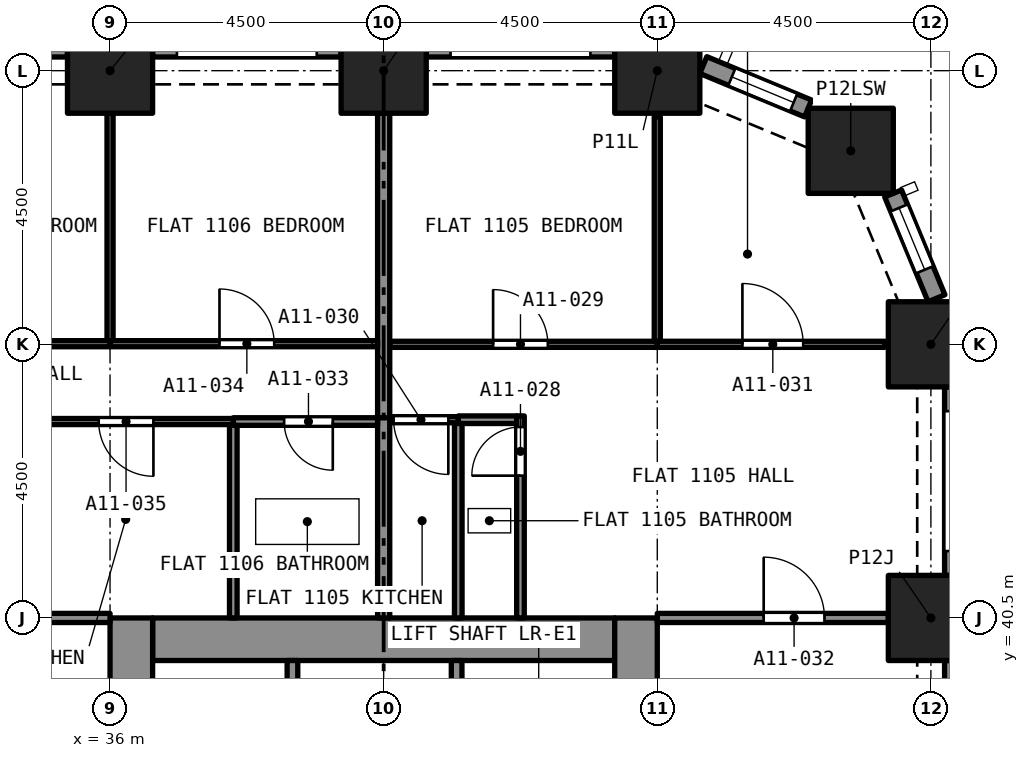
"""IFC4 building model, lengths in metres.
Left out: names, types, materials, properties, quantities, classifications, styles, units other than length and angle.
Written with IfcOpenShell. Run it as: python <this file> out.ifc"""

import sys

from ifc_helpers import new_model, si_unit, direction, frame, frame_2d, origin, origin_2d, place, context, subcontext, project, spatial, rectangle, extrude, element, fill, save


model = new_model("IFC4")
c1 = context("Model", 3, precision=1e-05, world=origin(), true_north=direction((0.0, 1.0)))
c2 = subcontext(c1, "Body", "Model", "MODEL_VIEW")
j1 = project(units=[si_unit("LENGTHUNIT", "METRE"), si_unit("PLANEANGLEUNIT", "RADIAN")], contexts=[c1])
p1 = place(None, origin())
s1 = spatial("IfcSite", under=j1, at=p1, CompositionType="ELEMENT")
p2 = place(p1, origin())
s2 = spatial("IfcBuilding", under=s1, at=p2, CompositionType="ELEMENT")
p3 = place(p2, frame((0.0, 0.0, 46.4)))
s3 = spatial("IfcBuildingStorey", under=s2, at=p3, CompositionType="ELEMENT", Elevation=46.4)
for number, where, z_axis, x_axis in (
    (1, (49.5, 40.5, 0.0), (0.0, 0.0, 1.0), (1.0, 0.0, 0.0)),
    (2, (49.5, 45.0, 0.0), (0.0, 0.0, 1.0), (1.0, 0.0, 0.0)),
    (3, (48.182, 48.182, 0.0), (0.0, 0.0, 1.0), (1.0, 0.0, 0.0)),
    (4, (36.0, 49.5, 0.0), (0.0, 0.0, 1.0), (1.0, 0.0, 0.0)),
    (5, (40.5, 49.5, 0.0), (0.0, 0.0, 1.0), (1.0, 0.0, 0.0)),
    (6, (45.0, 49.5, 0.0), (0.0, 0.0, 1.0), (1.0, 0.0, 0.0)),
):
    element("IfcColumn", number, at=place(p3, frame(where, z_axis=z_axis, x_axis=x_axis)), inside=s3, PredefinedType="COLUMN", context=c2, shape_type="SweptSolid", body=[
        extrude(rectangle(XDim=1.4, YDim=1.4, at=origin_2d()), origin(), (0.0, 0.0, 1.0), 3.2),
    ])
p4 = place(p3, frame((36.7, 40.15, 0.0), z_axis=(0.0, 0.0, 1.0), x_axis=(1.0, 0.0, 0.0)))
e7 = element("IfcWall", 7, at=p4, inside=s3, PredefinedType="SOLIDWALL", context=c2, shape_type="SweptSolid", body=[
    extrude(rectangle(XDim=7.6, YDim=0.7, at=frame_2d((3.8, 0.0))), origin(), (0.0, 0.0, 1.0), 3.2),
])
p5 = place(p3, frame((36.35, 27.0, 0.0), z_axis=(0.0, 0.0, 1.0), x_axis=(0.0, 1.0, 0.0)))
e8 = element("IfcWall", 8, at=p5, inside=s3, PredefinedType="SOLIDWALL", context=c2, shape_type="SweptSolid", body=[
    extrude(rectangle(XDim=13.5, YDim=0.7, at=frame_2d((6.75, 0.0))), origin(), (0.0, 0.0, 1.0), 3.2),
])
p6 = place(p5, frame((8.95, 0.0, 0.0)))
e9 = element("IfcOpeningElement", 9, at=p6, cuts=e8, PredefinedType="OPENING", context=c2, shape_type="SweptSolid", body=[
    extrude(rectangle(XDim=1.2, YDim=2.1, at=frame_2d((0.6, 1.05))), frame((0.0, 0.36, 0.0), z_axis=(0.0, -1.0, 0.0), x_axis=(1.0, 0.0, 0.0)), (0.0, 0.0, 1.0), 0.72),
])
p7 = place(p3, frame((44.65, 27.0, 0.0), z_axis=(0.0, 0.0, 1.0), x_axis=(0.0, 1.0, 0.0)))
e10 = element("IfcWall", 10, at=p7, inside=s3, PredefinedType="SOLIDWALL", context=c2, shape_type="SweptSolid", body=[
    extrude(rectangle(XDim=13.5, YDim=0.7, at=frame_2d((6.75, 0.0))), origin(), (0.0, 0.0, 1.0), 3.2),
])
p8 = place(p7, frame((8.95, 0.0, 0.0)))
e11 = element("IfcOpeningElement", 11, at=p8, cuts=e10, PredefinedType="OPENING", context=c2, shape_type="SweptSolid", body=[
    extrude(rectangle(XDim=1.2, YDim=2.1, at=frame_2d((0.6, 1.05))), frame((0.0, 0.36, 0.0), z_axis=(0.0, -1.0, 0.0), x_axis=(1.0, 0.0, 0.0)), (0.0, 0.0, 1.0), 0.72),
])
p9 = place(p3, frame((49.875, 39.8, 0.0), z_axis=(0.0, 0.0, 1.0), x_axis=(0.0, -1.0, 0.0)))
e12 = element("IfcWall", 12, at=p9, inside=s3, PredefinedType="SOLIDWALL", context=c2, shape_type="SweptSolid", body=[
    extrude(rectangle(XDim=3.1, YDim=0.3, at=frame_2d((1.55, 0.0))), origin(), (0.0, 0.0, 1.0), 3.2),
])
p10 = place(p9, frame((0.4, 0.0, 0.45)))
e13 = element("IfcOpeningElement", 13, at=p10, cuts=e12, PredefinedType="OPENING", context=c2, shape_type="SweptSolid", body=[
    extrude(rectangle(XDim=2.3, YDim=1.95, at=frame_2d((1.15, 0.975))), frame((0.0, 0.16, 0.0), z_axis=(0.0, -1.0, 0.0), x_axis=(1.0, 0.0, 0.0)), (0.0, 0.0, 1.0), 0.32),
])
p11 = place(p3, frame((49.875, 44.3, 0.0), z_axis=(0.0, 0.0, 1.0), x_axis=(0.0, -1.0, 0.0)))
e14 = element("IfcWall", 14, at=p11, inside=s3, PredefinedType="SOLIDWALL", context=c2, shape_type="SweptSolid", body=[
    extrude(rectangle(XDim=3.1, YDim=0.3, at=frame_2d((1.55, 0.0))), origin(), (0.0, 0.0, 1.0), 3.2),
])
p12 = place(p11, frame((0.4, 0.0, 0.45)))
e15 = element("IfcOpeningElement", 15, at=p12, cuts=e14, PredefinedType="OPENING", context=c2, shape_type="SweptSolid", body=[
    extrude(rectangle(XDim=2.3, YDim=1.95, at=frame_2d((1.15, 0.975))), frame((0.0, 0.16, 0.0), z_axis=(0.0, -1.0, 0.0), x_axis=(1.0, 0.0, 0.0)), (0.0, 0.0, 1.0), 0.32),
])
p13 = place(p3, frame((48.878, 47.48, 0.0), z_axis=(0.0, 0.0, 1.0), x_axis=(0.38262540684, -0.923903565336, 0.0)))
e16 = element("IfcWall", 16, at=p13, inside=s3, PredefinedType="SOLIDWALL", context=c2, shape_type="SweptSolid", body=[
    extrude(rectangle(XDim=1.865, YDim=0.3, at=frame_2d((0.933, 0.0))), origin(), (0.0, 0.0, 1.0), 3.2),
])
p14 = place(p13, frame((0.258, 0.0, 0.45)))
e17 = element("IfcOpeningElement", 17, at=p14, cuts=e16, PredefinedType="OPENING", context=c2, shape_type="SweptSolid", body=[
    extrude(rectangle(XDim=1.1, YDim=1.95, at=frame_2d((0.55, 0.975))), frame((0.0, 0.16, 0.0), z_axis=(0.0, -1.0, 0.0), x_axis=(1.0, 0.0, 0.0)), (0.0, 0.0, 1.0), 0.32),
])
p15 = place(p3, frame((45.757, 49.592, 0.0), z_axis=(0.0, 0.0, 1.0), x_axis=(0.923857286003, -0.382737135771, 0.0)))
e18 = element("IfcWall", 18, at=p15, inside=s3, PredefinedType="SOLIDWALL", context=c2, shape_type="SweptSolid", body=[
    extrude(rectangle(XDim=1.865, YDim=0.3, at=frame_2d((0.933, 0.0))), origin(), (0.0, 0.0, 1.0), 3.2),
])
p16 = place(p15, frame((0.508, 0.0, 0.45)))
e19 = element("IfcOpeningElement", 19, at=p16, cuts=e18, PredefinedType="OPENING", context=c2, shape_type="SweptSolid", body=[
    extrude(rectangle(XDim=1.1, YDim=1.95, at=frame_2d((0.55, 0.975))), frame((0.0, 0.16, 0.0), z_axis=(0.0, -1.0, 0.0), x_axis=(1.0, 0.0, 0.0)), (0.0, 0.0, 1.0), 0.32),
])
p17 = place(p3, frame((41.2, 49.875, 0.0), z_axis=(0.0, 0.0, 1.0), x_axis=(1.0, 0.0, 0.0)))
e20 = element("IfcWall", 20, at=p17, inside=s3, PredefinedType="SOLIDWALL", context=c2, shape_type="SweptSolid", body=[
    extrude(rectangle(XDim=3.1, YDim=0.3, at=frame_2d((1.55, 0.0))), origin(), (0.0, 0.0, 1.0), 3.2),
])
p18 = place(p17, frame((0.4, 0.0, 0.45)))
e21 = element("IfcOpeningElement", 21, at=p18, cuts=e20, PredefinedType="OPENING", context=c2, shape_type="SweptSolid", body=[
    extrude(rectangle(XDim=2.3, YDim=1.95, at=frame_2d((1.15, 0.975))), frame((0.0, 0.16, 0.0), z_axis=(0.0, -1.0, 0.0), x_axis=(1.0, 0.0, 0.0)), (0.0, 0.0, 1.0), 0.32),
])
p19 = place(p3, frame((36.7, 49.875, 0.0), z_axis=(0.0, 0.0, 1.0), x_axis=(1.0, 0.0, 0.0)))
e22 = element("IfcWall", 22, at=p19, inside=s3, PredefinedType="SOLIDWALL", context=c2, shape_type="SweptSolid", body=[
    extrude(rectangle(XDim=3.1, YDim=0.3, at=frame_2d((1.55, 0.0))), origin(), (0.0, 0.0, 1.0), 3.2),
])
p20 = place(p19, frame((0.4, 0.0, 0.45)))
e23 = element("IfcOpeningElement", 23, at=p20, cuts=e22, PredefinedType="OPENING", context=c2, shape_type="SweptSolid", body=[
    extrude(rectangle(XDim=2.3, YDim=1.95, at=frame_2d((1.15, 0.975))), frame((0.0, 0.16, 0.0), z_axis=(0.0, -1.0, 0.0), x_axis=(1.0, 0.0, 0.0)), (0.0, 0.0, 1.0), 0.32),
])
p21 = place(p3, frame((32.2, 49.875, 0.0), z_axis=(0.0, 0.0, 1.0), x_axis=(1.0, 0.0, 0.0)))
e24 = element("IfcWall", 24, at=p21, inside=s3, PredefinedType="SOLIDWALL", context=c2, shape_type="SweptSolid", body=[
    extrude(rectangle(XDim=3.1, YDim=0.3, at=frame_2d((1.55, 0.0))), origin(), (0.0, 0.0, 1.0), 3.2),
])
p22 = place(p21, frame((0.4, 0.0, 0.45)))
e25 = element("IfcOpeningElement", 25, at=p22, cuts=e24, PredefinedType="OPENING", context=c2, shape_type="SweptSolid", body=[
    extrude(rectangle(XDim=2.3, YDim=1.95, at=frame_2d((1.15, 0.975))), frame((0.0, 0.16, 0.0), z_axis=(0.0, -1.0, 0.0), x_axis=(1.0, 0.0, 0.0)), (0.0, 0.0, 1.0), 0.32),
])
p23 = place(p3, frame((41.727, 43.76, 0.0), z_axis=(0.0, 0.0, 1.0), x_axis=(1.0, 0.0, 0.0)))
e26 = element("IfcWall", 26, at=p23, inside=s3, PredefinedType="PARTITIONING", context=c2, shape_type="SweptSolid", body=[
    extrude(rectangle(XDim=0.96, YDim=0.125, at=frame_2d((0.48, 0.0))), origin(), (0.0, 0.0, 1.0), 2.9),
])
p24 = place(p3, frame((42.75, 40.5, 0.0), z_axis=(0.0, 0.0, 1.0), x_axis=(0.0, 1.0, 0.0)))
e27 = element("IfcWall", 27, at=p24, inside=s3, PredefinedType="PARTITIONING", context=c2, shape_type="SweptSolid", body=[
    extrude(rectangle(XDim=3.323, YDim=0.125, at=frame_2d((1.661, 0.0))), origin(), (0.0, 0.0, 1.0), 2.9),
])
p25 = place(p24, frame((2.34, 0.0, 0.0)))
e28 = element("IfcOpeningElement", 28, at=p25, cuts=e27, PredefinedType="OPENING", context=c2, shape_type="SweptSolid", body=[
    extrude(rectangle(XDim=0.8, YDim=2.1, at=frame_2d((0.4, 1.05))), frame((0.0, 0.073, 0.0), z_axis=(0.0, -1.0, 0.0), x_axis=(1.0, 0.0, 0.0)), (0.0, 0.0, 1.0), 0.145),
])
p26 = place(p3, frame((41.727, 40.5, 0.0), z_axis=(0.0, 0.0, 1.0), x_axis=(0.0, 1.0, 0.0)))
e29 = element("IfcWall", 29, at=p26, inside=s3, PredefinedType="PARTITIONING", context=c2, shape_type="SweptSolid", body=[
    extrude(rectangle(XDim=3.198, YDim=0.125, at=frame_2d((1.599, 0.0))), origin(), (0.0, 0.0, 1.0), 2.9),
])
p27 = place(p3, frame((40.6, 45.0, 0.0), z_axis=(0.0, 0.0, 1.0), x_axis=(1.0, 0.0, 0.0)))
e30 = element("IfcWall", 30, at=p27, inside=s3, PredefinedType="PARTITIONING", context=c2, shape_type="SweptSolid", body=[
    extrude(rectangle(XDim=4.4, YDim=0.1, at=frame_2d((2.2, 0.0))), origin(), (0.0, 0.0, 1.0), 2.9),
])
p28 = place(p27, frame((1.7, 0.0, 0.0)))
e31 = element("IfcOpeningElement", 31, at=p28, cuts=e30, PredefinedType="OPENING", context=c2, shape_type="SweptSolid", body=[
    extrude(rectangle(XDim=0.9, YDim=2.1, at=frame_2d((0.45, 1.05))), frame((0.0, 0.06, 0.0), z_axis=(0.0, -1.0, 0.0), x_axis=(1.0, 0.0, 0.0)), (0.0, 0.0, 1.0), 0.12),
])
p29 = place(p3, frame((45.0, 45.05, 0.0), z_axis=(0.0, 0.0, 1.0), x_axis=(0.0, 1.0, 0.0)))
e32 = element("IfcWall", 32, at=p29, inside=s3, PredefinedType="PARTITIONING", context=c2, shape_type="SweptSolid", body=[
    extrude(rectangle(XDim=3.692, YDim=0.1, at=frame_2d((1.846, 0.0))), origin(), (0.0, 0.0, 1.0), 2.9),
])
p30 = place(p3, frame((41.727, 43.76, 0.0), z_axis=(0.0, 0.0, 1.0), x_axis=(-1.0, 0.0, 0.0)))
e33 = element("IfcWall", 33, at=p30, inside=s3, PredefinedType="PARTITIONING", context=c2, shape_type="SweptSolid", body=[
    extrude(rectangle(XDim=1.127, YDim=0.1, at=frame_2d((0.563, 0.0))), origin(), (0.0, 0.0, 1.0), 2.9),
])
p31 = place(p30, frame((0.164, 0.0, 0.0)))
e34 = element("IfcOpeningElement", 34, at=p31, cuts=e33, PredefinedType="OPENING", context=c2, shape_type="SweptSolid", body=[
    extrude(rectangle(XDim=0.9, YDim=2.1, at=frame_2d((0.45, 1.05))), frame((0.0, 0.06, 0.0), z_axis=(0.0, -1.0, 0.0), x_axis=(1.0, 0.0, 0.0)), (0.0, 0.0, 1.0), 0.12),
])
p32 = place(p3, frame((45.0, 45.0, 0.0), z_axis=(0.0, 0.0, 1.0), x_axis=(1.0, 0.0, 0.0)))
e35 = element("IfcWall", 35, at=p32, inside=s3, PredefinedType="PARTITIONING", context=c2, shape_type="SweptSolid", body=[
    extrude(rectangle(XDim=3.742, YDim=0.1, at=frame_2d((1.871, 0.0))), origin(), (0.0, 0.0, 1.0), 2.9),
])
p33 = place(p32, frame((1.4, 0.0, 0.0)))
e36 = element("IfcOpeningElement", 36, at=p33, cuts=e35, PredefinedType="OPENING", context=c2, shape_type="SweptSolid", body=[
    extrude(rectangle(XDim=1.0, YDim=2.1, at=frame_2d((0.5, 1.05))), frame((0.0, 0.06, 0.0), z_axis=(0.0, -1.0, 0.0), x_axis=(1.0, 0.0, 0.0)), (0.0, 0.0, 1.0), 0.12),
])
p34 = place(p3, frame((40.5, 43.71, 0.0), z_axis=(0.0, 0.0, 1.0), x_axis=(0.0, 1.0, 0.0)))
e37 = element("IfcWall", 37, at=p34, inside=s3, PredefinedType="PARTITIONING", context=c2, shape_type="SweptSolid", body=[
    extrude(rectangle(XDim=5.09, YDim=0.2, at=frame_2d((2.545, 0.0))), origin(), (0.0, 0.0, 1.0), 2.9),
])
p35 = place(p3, frame((45.0, 40.5, 0.0), z_axis=(0.0, 0.0, 1.0), x_axis=(1.0, 0.0, 0.0)))
e38 = element("IfcWall", 38, at=p35, inside=s3, PredefinedType="PARTITIONING", context=c2, shape_type="SweptSolid", body=[
    extrude(rectangle(XDim=3.8, YDim=0.15, at=frame_2d((1.9, 0.0))), origin(), (0.0, 0.0, 1.0), 2.9),
])
p36 = place(p35, frame((1.75, 0.0, 0.0)))
e39 = element("IfcOpeningElement", 39, at=p36, cuts=e38, PredefinedType="OPENING", context=c2, shape_type="SweptSolid", body=[
    extrude(rectangle(XDim=1.0, YDim=2.1, at=frame_2d((0.5, 1.05))), frame((0.0, 0.085, 0.0), z_axis=(0.0, -1.0, 0.0), x_axis=(1.0, 0.0, 0.0)), (0.0, 0.0, 1.0), 0.17),
])
p37 = place(p3, frame((40.5, 40.5, 0.0), z_axis=(0.0, 0.0, 1.0), x_axis=(0.0, 1.0, 0.0)))
e40 = element("IfcWall", 40, at=p37, inside=s3, PredefinedType="PARTITIONING", context=c2, shape_type="SweptSolid", body=[
    extrude(rectangle(XDim=3.292, YDim=0.2, at=frame_2d((1.646, 0.0))), origin(), (0.0, 0.0, 1.0), 2.9),
])
p38 = place(p3, frame((40.4, 43.73, 0.0), z_axis=(0.0, 0.0, 1.0), x_axis=(-1.0, 0.0, 0.0)))
e41 = element("IfcWall", 41, at=p38, inside=s3, PredefinedType="PARTITIONING", context=c2, shape_type="SweptSolid", body=[
    extrude(rectangle(XDim=2.373, YDim=0.125, at=frame_2d((1.187, 0.0))), origin(), (0.0, 0.0, 1.0), 2.9),
])
p39 = place(p38, frame((0.737, 0.0, 0.0)))
e42 = element("IfcOpeningElement", 42, at=p39, cuts=e41, PredefinedType="OPENING", context=c2, shape_type="SweptSolid", body=[
    extrude(rectangle(XDim=0.8, YDim=2.1, at=frame_2d((0.4, 1.05))), frame((0.0, 0.073, 0.0), z_axis=(0.0, -1.0, 0.0), x_axis=(1.0, 0.0, 0.0)), (0.0, 0.0, 1.0), 0.145),
])
p40 = place(p3, frame((38.027, 40.5, 0.0), z_axis=(0.0, 0.0, 1.0), x_axis=(0.0, 1.0, 0.0)))
e43 = element("IfcWall", 43, at=p40, inside=s3, PredefinedType="PARTITIONING", context=c2, shape_type="SweptSolid", body=[
    extrude(rectangle(XDim=3.167, YDim=0.125, at=frame_2d((1.584, 0.0))), origin(), (0.0, 0.0, 1.0), 2.9),
])
p41 = place(p3, frame((36.0, 45.01, 0.0), z_axis=(0.0, 0.0, 1.0), x_axis=(1.0, 0.0, 0.0)))
e44 = element("IfcWall", 44, at=p41, inside=s3, PredefinedType="PARTITIONING", context=c2, shape_type="SweptSolid", body=[
    extrude(rectangle(XDim=4.4, YDim=0.1, at=frame_2d((2.2, 0.0))), origin(), (0.0, 0.0, 1.0), 2.9),
])
p42 = place(p41, frame((1.8, 0.0, 0.0)))
e45 = element("IfcOpeningElement", 45, at=p42, cuts=e44, PredefinedType="OPENING", context=c2, shape_type="SweptSolid", body=[
    extrude(rectangle(XDim=0.9, YDim=2.1, at=frame_2d((0.45, 1.05))), frame((0.0, 0.06, 0.0), z_axis=(0.0, -1.0, 0.0), x_axis=(1.0, 0.0, 0.0)), (0.0, 0.0, 1.0), 0.12),
])
p43 = place(p3, frame((36.0, 45.06, 0.0), z_axis=(0.0, 0.0, 1.0), x_axis=(0.0, 1.0, 0.0)))
e46 = element("IfcWall", 46, at=p43, inside=s3, PredefinedType="PARTITIONING", context=c2, shape_type="SweptSolid", body=[
    extrude(rectangle(XDim=3.74, YDim=0.1, at=frame_2d((1.87, 0.0))), origin(), (0.0, 0.0, 1.0), 2.9),
])
p44 = place(p3, frame((38.027, 43.73, 0.0), z_axis=(0.0, 0.0, 1.0), x_axis=(-1.0, 0.0, 0.0)))
e47 = element("IfcWall", 47, at=p44, inside=s3, PredefinedType="PARTITIONING", context=c2, shape_type="SweptSolid", body=[
    extrude(rectangle(XDim=3.577, YDim=0.1, at=frame_2d((1.788, 0.0))), origin(), (0.0, 0.0, 1.0), 2.9),
])
p45 = place(p44, frame((1.313, 0.0, 0.0)))
e48 = element("IfcOpeningElement", 48, at=p45, cuts=e47, PredefinedType="OPENING", context=c2, shape_type="SweptSolid", body=[
    extrude(rectangle(XDim=0.9, YDim=2.1, at=frame_2d((0.45, 1.05))), frame((0.0, 0.06, 0.0), z_axis=(0.0, -1.0, 0.0), x_axis=(1.0, 0.0, 0.0)), (0.0, 0.0, 1.0), 0.12),
])
p46 = place(p3, frame((32.2, 45.01, 0.0), z_axis=(0.0, 0.0, 1.0), x_axis=(1.0, 0.0, 0.0)))
e49 = element("IfcWall", 49, at=p46, inside=s3, PredefinedType="PARTITIONING", context=c2, shape_type="SweptSolid", body=[
    extrude(rectangle(XDim=3.8, YDim=0.1, at=frame_2d((1.9, 0.0))), origin(), (0.0, 0.0, 1.0), 2.9),
])
p47 = place(p46, frame((1.05, 0.0, 0.0)))
e50 = element("IfcOpeningElement", 50, at=p47, cuts=e49, PredefinedType="OPENING", context=c2, shape_type="SweptSolid", body=[
    extrude(rectangle(XDim=1.0, YDim=2.1, at=frame_2d((0.5, 1.05))), frame((0.0, 0.06, 0.0), z_axis=(0.0, -1.0, 0.0), x_axis=(1.0, 0.0, 0.0)), (0.0, 0.0, 1.0), 0.12),
])
p48 = place(p3, frame((34.5, 40.5, 0.0), z_axis=(0.0, 0.0, 1.0), x_axis=(1.0, 0.0, 0.0)))
e51 = element("IfcWall", 51, at=p48, inside=s3, PredefinedType="PARTITIONING", context=c2, shape_type="SweptSolid", body=[
    extrude(rectangle(XDim=1.5, YDim=0.15, at=frame_2d((0.75, 0.0))), origin(), (0.0, 0.0, 1.0), 2.9),
])
for number, where, z_axis, x_axis in (
    (52, (41.7, 37.5, 0.0), (0.0, 0.0, 1.0), (0.0, 1.0, 0.0)),
    (53, (39.0, 37.5, 0.0), (0.0, 0.0, 1.0), (0.0, 1.0, 0.0)),
):
    element("IfcWall", number, at=place(p3, frame(where, z_axis=z_axis, x_axis=x_axis)), inside=s3, PredefinedType="SOLIDWALL", context=c2, shape_type="SweptSolid", body=[
        extrude(rectangle(XDim=2.3, YDim=0.175, at=frame_2d((1.15, 0.0))), origin(), (0.0, 0.0, 1.0), 2.9),
    ])
p49 = place(p14, origin())
e54 = element("IfcWindow", 54, at=p49, inside=s3, PartitioningType="SINGLE_PANEL", PredefinedType="WINDOW", context=c2, shape_type="SweptSolid", body=[
    extrude(rectangle(XDim=1.1, YDim=1.95, at=frame_2d((0.55, 0.975))), frame((0.0, 0.03, 0.0), z_axis=(0.0, -1.0, 0.0), x_axis=(1.0, 0.0, 0.0)), (0.0, 0.0, 1.0), 0.06),
])
fill(e17, e54)
p50 = place(p16, origin())
e55 = element("IfcWindow", 55, at=p50, inside=s3, PartitioningType="SINGLE_PANEL", PredefinedType="WINDOW", context=c2, shape_type="SweptSolid", body=[
    extrude(rectangle(XDim=1.1, YDim=1.95, at=frame_2d((0.55, 0.975))), frame((0.0, 0.03, 0.0), z_axis=(0.0, -1.0, 0.0), x_axis=(1.0, 0.0, 0.0)), (0.0, 0.0, 1.0), 0.06),
])
fill(e19, e55)
p51 = place(p25, origin())
e56 = element("IfcDoor", 56, at=p51, inside=s3, OperationType="SINGLE_SWING_RIGHT", PredefinedType="DOOR", context=c2, shape_type="SweptSolid", body=[
    extrude(rectangle(XDim=0.8, YDim=2.1, at=frame_2d((0.4, 1.05))), frame((0.0, 0.025, 0.0), z_axis=(0.0, -1.0, 0.0), x_axis=(1.0, 0.0, 0.0)), (0.0, 0.0, 1.0), 0.05),
])
fill(e28, e56)
p52 = place(p28, origin())
e57 = element("IfcDoor", 57, at=p52, inside=s3, OperationType="SINGLE_SWING_LEFT", PredefinedType="DOOR", context=c2, shape_type="SweptSolid", body=[
    extrude(rectangle(XDim=0.9, YDim=2.1, at=frame_2d((0.45, 1.05))), frame((0.0, 0.025, 0.0), z_axis=(0.0, -1.0, 0.0), x_axis=(1.0, 0.0, 0.0)), (0.0, 0.0, 1.0), 0.05),
])
fill(e31, e57)
p53 = place(p31, origin())
e58 = element("IfcDoor", 58, at=p53, inside=s3, OperationType="SINGLE_SWING_RIGHT", PredefinedType="DOOR", context=c2, shape_type="SweptSolid", body=[
    extrude(rectangle(XDim=0.9, YDim=2.1, at=frame_2d((0.45, 1.05))), frame((0.0, 0.025, 0.0), z_axis=(0.0, -1.0, 0.0), x_axis=(1.0, 0.0, 0.0)), (0.0, 0.0, 1.0), 0.05),
])
fill(e34, e58)
p54 = place(p33, origin())
e59 = element("IfcDoor", 59, at=p54, inside=s3, OperationType="SINGLE_SWING_RIGHT", PredefinedType="DOOR", context=c2, shape_type="SweptSolid", body=[
    extrude(rectangle(XDim=1.0, YDim=2.1, at=frame_2d((0.5, 1.05))), frame((0.0, 0.025, 0.0), z_axis=(0.0, -1.0, 0.0), x_axis=(1.0, 0.0, 0.0)), (0.0, 0.0, 1.0), 0.05),
])
fill(e36, e59)
p55 = place(p36, origin())
e60 = element("IfcDoor", 60, at=p55, inside=s3, OperationType="SINGLE_SWING_RIGHT", PredefinedType="DOOR", context=c2, shape_type="SweptSolid", body=[
    extrude(rectangle(XDim=1.0, YDim=2.1, at=frame_2d((0.5, 1.05))), frame((0.0, 0.025, 0.0), z_axis=(0.0, -1.0, 0.0), x_axis=(1.0, 0.0, 0.0)), (0.0, 0.0, 1.0), 0.05),
])
fill(e39, e60)
p56 = place(p39, origin())
e61 = element("IfcDoor", 61, at=p56, inside=s3, OperationType="SINGLE_SWING_LEFT", PredefinedType="DOOR", context=c2, shape_type="SweptSolid", body=[
    extrude(rectangle(XDim=0.8, YDim=2.1, at=frame_2d((0.4, 1.05))), frame((0.0, 0.025, 0.0), z_axis=(0.0, -1.0, 0.0), x_axis=(1.0, 0.0, 0.0)), (0.0, 0.0, 1.0), 0.05),
])
fill(e42, e61)
p57 = place(p42, origin())
e62 = element("IfcDoor", 62, at=p57, inside=s3, OperationType="SINGLE_SWING_RIGHT", PredefinedType="DOOR", context=c2, shape_type="SweptSolid", body=[
    extrude(rectangle(XDim=0.9, YDim=2.1, at=frame_2d((0.45, 1.05))), frame((0.0, 0.025, 0.0), z_axis=(0.0, -1.0, 0.0), x_axis=(1.0, 0.0, 0.0)), (0.0, 0.0, 1.0), 0.05),
])
fill(e45, e62)
p58 = place(p45, origin())
e63 = element("IfcDoor", 63, at=p58, inside=s3, OperationType="SINGLE_SWING_LEFT", PredefinedType="DOOR", context=c2, shape_type="SweptSolid", body=[
    extrude(rectangle(XDim=0.9, YDim=2.1, at=frame_2d((0.45, 1.05))), frame((0.0, 0.025, 0.0), z_axis=(0.0, -1.0, 0.0), x_axis=(1.0, 0.0, 0.0)), (0.0, 0.0, 1.0), 0.05),
])
fill(e48, e63)
save(model, sys.argv[1])
